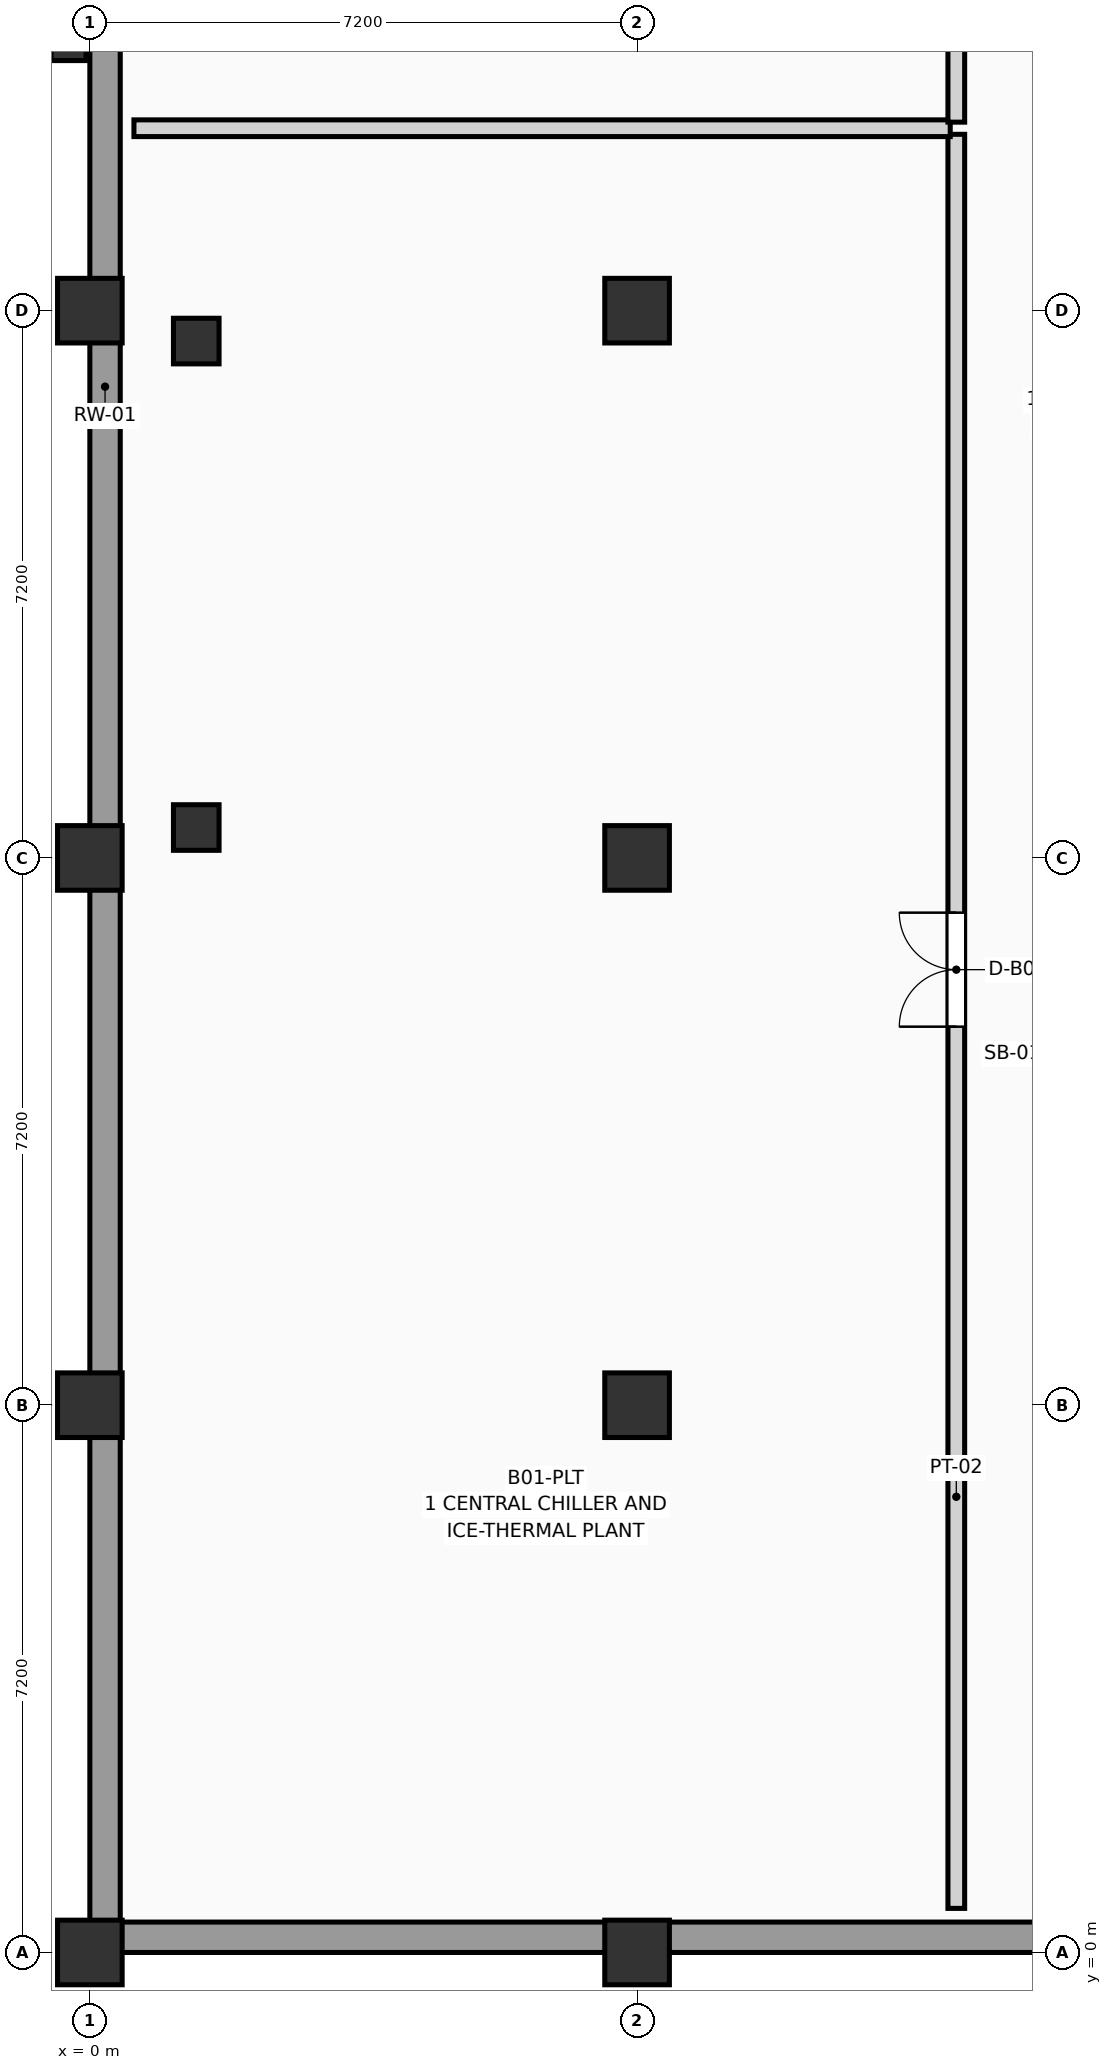
"""IFC4 building model, lengths in metres.
Left out: names, types, materials, properties, quantities, classifications, styles, units other than length and angle.
Written with IfcOpenShell. Run it as: python <this file> out.ifc"""

import sys

from ifc_helpers import new_model, si_unit, direction, frame, frame_2d, origin, origin_2d, place, context, subcontext, project, spatial, rectangle, extrude, element, fill, save


model = new_model("IFC4")
c1 = context("Model", 3, precision=1e-05, world=origin(), true_north=direction((0.0, 1.0)))
c2 = subcontext(c1, "Body", "Model", "MODEL_VIEW")
j1 = project(units=[si_unit("LENGTHUNIT", "METRE"), si_unit("PLANEANGLEUNIT", "RADIAN")], contexts=[c1])
p1 = place(None, origin())
s1 = spatial("IfcSite", under=j1, at=p1, CompositionType="ELEMENT")
p2 = place(p1, origin())
s2 = spatial("IfcBuilding", under=s1, at=p2, CompositionType="ELEMENT")
p3 = place(p2, frame((0.0, 0.0, -4.5)))
s3 = spatial("IfcBuildingStorey", under=s2, at=p3, CompositionType="ELEMENT", Elevation=-4.5)
for number, where, z_axis, x_axis in (
    (1, (0.0, 0.0, -0.3), (0.0, 0.0, 1.0), (1.0, 0.0, 0.0)),
    (2, (0.0, 7.2, -0.3), (0.0, 0.0, 1.0), (1.0, 0.0, 0.0)),
    (3, (0.0, 14.4, -0.3), (0.0, 0.0, 1.0), (1.0, 0.0, 0.0)),
    (4, (0.0, 21.6, -0.3), (0.0, 0.0, 1.0), (1.0, 0.0, 0.0)),
    (5, (7.2, 0.0, -0.3), (0.0, 0.0, 1.0), (1.0, 0.0, 0.0)),
    (6, (7.2, 7.2, -0.3), (0.0, 0.0, 1.0), (1.0, 0.0, 0.0)),
    (7, (7.2, 14.4, -0.3), (0.0, 0.0, 1.0), (1.0, 0.0, 0.0)),
    (8, (7.2, 21.6, -0.3), (0.0, 0.0, 1.0), (1.0, 0.0, 0.0)),
):
    element("IfcColumn", number, at=place(p3, frame(where, z_axis=z_axis, x_axis=x_axis)), inside=s3, PredefinedType="COLUMN", context=c2, shape_type="SweptSolid", body=[
        extrude(rectangle(XDim=0.85, YDim=0.85, at=origin_2d()), origin(), (0.0, 0.0, 1.0), 4.8),
    ])
for number, where, z_axis, x_axis in (
    (9, (1.4, 14.8, -0.3), (0.0, 0.0, 1.0), (1.0, 0.0, 0.0)),
    (10, (1.4, 21.2, -0.3), (0.0, 0.0, 1.0), (1.0, 0.0, 0.0)),
):
    element("IfcColumn", number, at=place(p3, frame(where, z_axis=z_axis, x_axis=x_axis)), inside=s3, PredefinedType="COLUMN", context=c2, shape_type="SweptSolid", body=[
        extrude(rectangle(XDim=0.6, YDim=0.6, at=origin_2d()), origin(), (0.0, 0.0, 1.0), 4.8),
    ])
p4 = place(p3, frame((-0.28, 25.2, -0.3), z_axis=(0.0, 0.0, 1.0), x_axis=(1.0, 0.0, 0.0)))
e11 = element("IfcColumn", 11, at=p4, inside=s3, PredefinedType="PILASTER", context=c2, shape_type="SweptSolid", body=[
    extrude(rectangle(XDim=0.46, YDim=0.62, at=origin_2d()), origin(), (0.0, 0.0, 1.0), 4.8),
])
p5 = place(p3, frame((28.8, 0.2, -0.3), z_axis=(0.0, 0.0, 1.0), x_axis=(-1.0, 0.0, 0.0)))
e12 = element("IfcWall", 12, at=p5, inside=s3, PredefinedType="USERDEFINED", context=c2, shape_type="SweptSolid", body=[
    extrude(rectangle(XDim=28.8, YDim=0.4, at=frame_2d((14.4, 0.0))), origin(), (0.0, 0.0, 1.0), 4.54),
])
p6 = place(p3, frame((0.2, 0.0, -0.3), z_axis=(0.0, 0.0, 1.0), x_axis=(0.0, 1.0, 0.0)))
e13 = element("IfcWall", 13, at=p6, inside=s3, PredefinedType="USERDEFINED", context=c2, shape_type="SweptSolid", body=[
    extrude(rectangle(XDim=56.4, YDim=0.4, at=frame_2d((28.2, 0.0))), origin(), (0.0, 0.0, 1.0), 4.54),
])
p7 = place(p3, frame((11.4, 0.58, 0.0), z_axis=(0.0, 0.0, 1.0), x_axis=(0.0, 1.0, 0.0)))
e14 = element("IfcWall", 14, at=p7, inside=s3, PredefinedType="PARTITIONING", context=c2, shape_type="SweptSolid", body=[
    extrude(rectangle(XDim=23.34, YDim=0.22, at=frame_2d((11.67, 0.0))), origin(), (0.0, 0.0, 1.0), 4.225),
])
p8 = place(p7, frame((11.6, 0.0, 0.0)))
e15 = element("IfcOpeningElement", 15, at=p8, cuts=e14, PredefinedType="OPENING", context=c2, shape_type="SweptSolid", body=[
    extrude(rectangle(XDim=1.5, YDim=2.25, at=frame_2d((0.75, 1.125))), frame((0.0, 0.122, 0.0), z_axis=(0.0, -1.0, 0.0), x_axis=(1.0, 0.0, 0.0)), (0.0, 0.0, 1.0), 0.244),
])
p9 = place(p3, frame((0.58, 24.0, 0.0), z_axis=(0.0, 0.0, 1.0), x_axis=(1.0, 0.0, 0.0)))
e16 = element("IfcWall", 16, at=p9, inside=s3, PredefinedType="PARTITIONING", context=c2, shape_type="SweptSolid", body=[
    extrude(rectangle(XDim=10.74, YDim=0.22, at=frame_2d((5.37, 0.0))), origin(), (0.0, 0.0, 1.0), 4.225),
])
p10 = place(p3, frame((11.4, 24.08, 0.0), z_axis=(0.0, 0.0, 1.0), x_axis=(0.0, 1.0, 0.0)))
e17 = element("IfcWall", 17, at=p10, inside=s3, PredefinedType="PARTITIONING", context=c2, shape_type="SweptSolid", body=[
    extrude(rectangle(XDim=17.84, YDim=0.22, at=frame_2d((8.92, 0.0))), origin(), (0.0, 0.0, 1.0), 4.225),
])
p11 = place(p10, frame((8.17, 0.0, 0.0)))
e18 = element("IfcOpeningElement", 18, at=p11, cuts=e17, PredefinedType="OPENING", context=c2, shape_type="SweptSolid", body=[
    extrude(rectangle(XDim=1.5, YDim=2.25, at=frame_2d((0.75, 1.125))), frame((0.0, 0.122, 0.0), z_axis=(0.0, -1.0, 0.0), x_axis=(1.0, 0.0, 0.0)), (0.0, 0.0, 1.0), 0.244),
])
p12 = place(p8, origin())
e19 = element("IfcDoor", 19, at=p12, inside=s3, OperationType="DOUBLE_DOOR_SINGLE_SWING", PredefinedType="DOOR", context=c2, shape_type="SweptSolid", body=[
    extrude(rectangle(XDim=1.5, YDim=2.25, at=frame_2d((0.75, 1.125))), frame((0.0, 0.025, 0.0), z_axis=(0.0, -1.0, 0.0), x_axis=(1.0, 0.0, 0.0)), (0.0, 0.0, 1.0), 0.05),
])
fill(e15, e19)
save(model, sys.argv[1])
